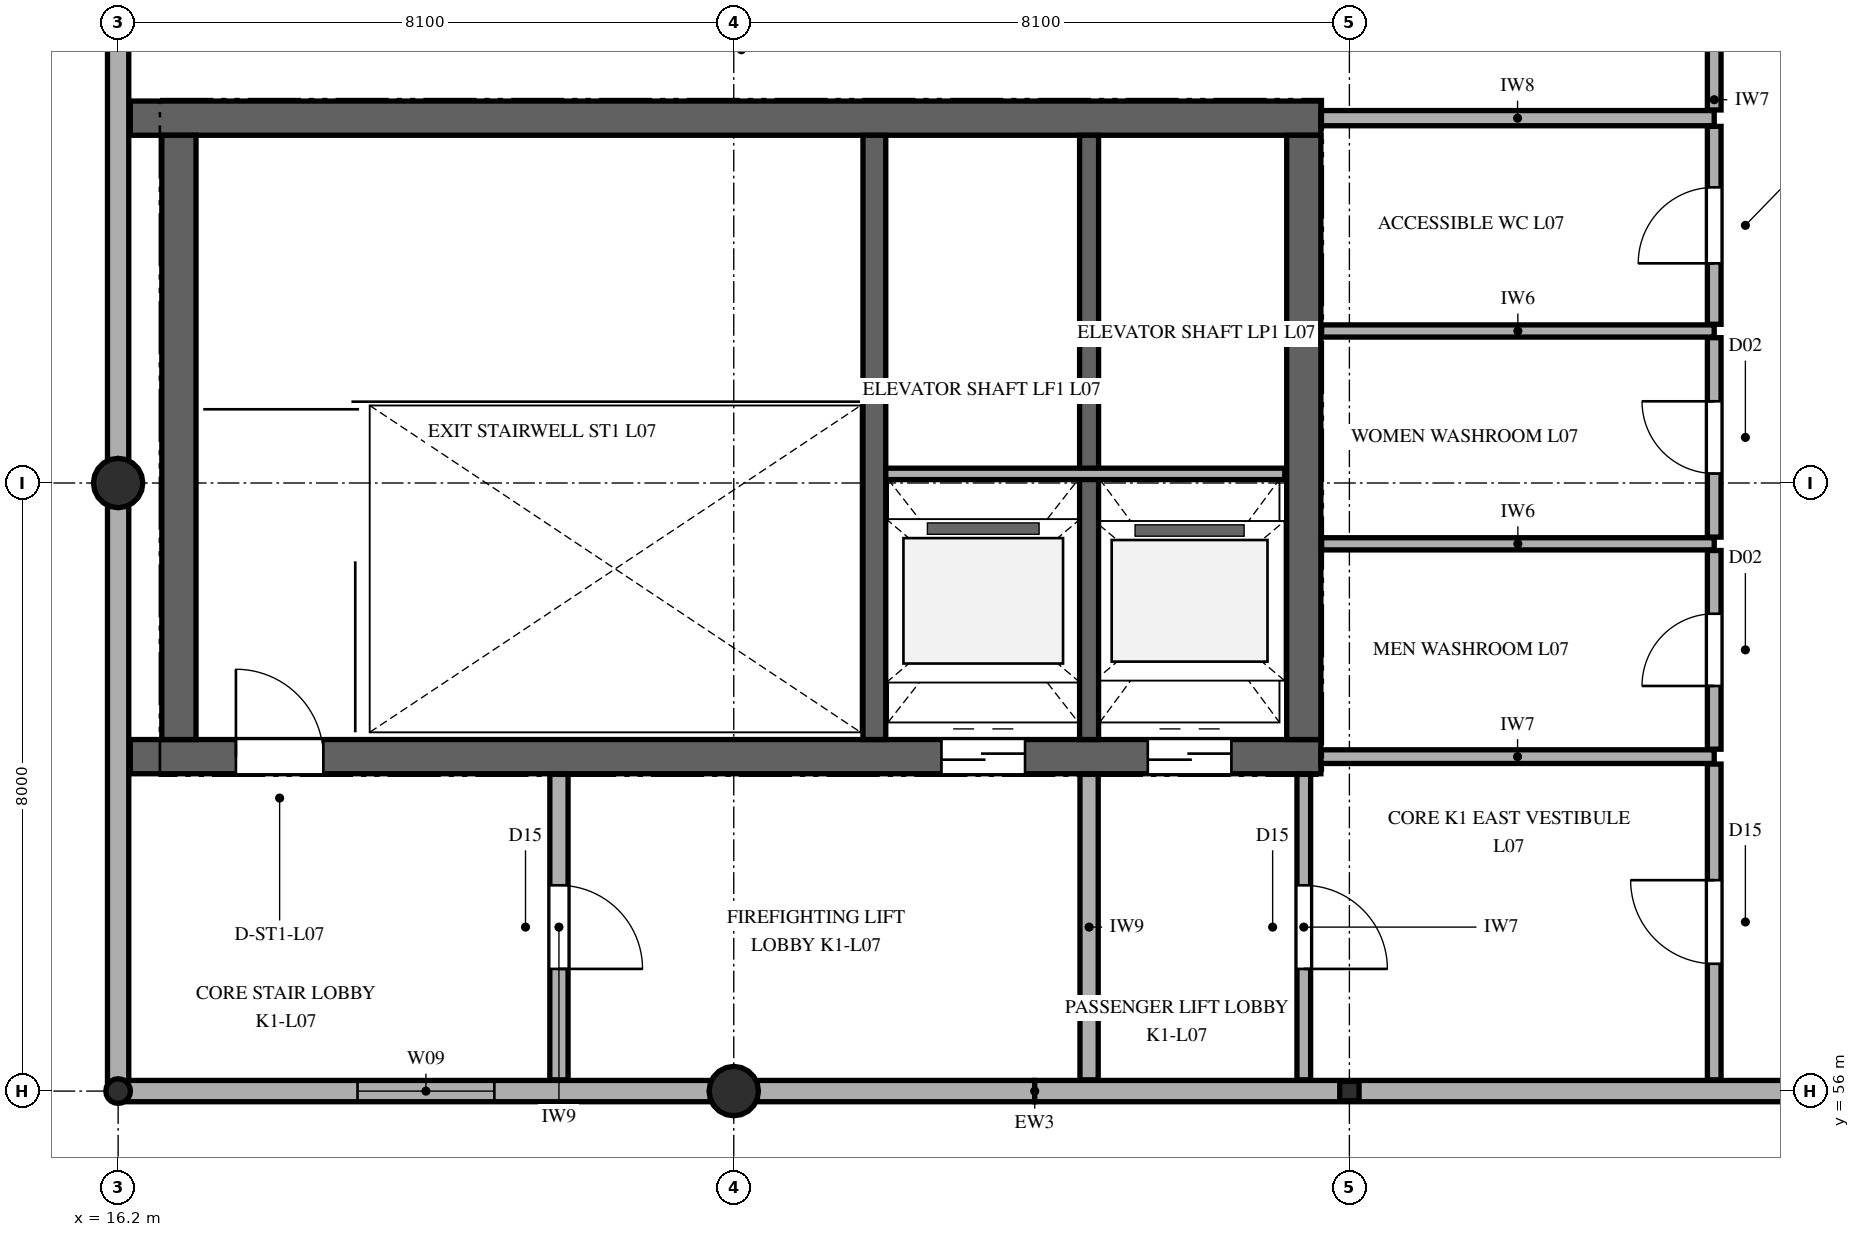
"""IFC4 building model, lengths in metres.
Left out: names, types, materials, properties, quantities, classifications, styles, units other than length and angle.
Written with IfcOpenShell. Run it as: python <this file> out.ifc"""

import sys

from ifc_helpers import new_model, si_unit, direction, frame, frame_2d, origin, origin_2d, place, context, subcontext, project, spatial, rectangle, hollow_rectangle, circle, hollow_circle, extrude, element, fill, save


model = new_model("IFC4")
c1 = context("Model", 3, precision=1e-05, world=origin(), true_north=direction((0.0, 1.0)))
c2 = subcontext(c1, "Body", "Model", "MODEL_VIEW")
j1 = project(units=[si_unit("LENGTHUNIT", "METRE"), si_unit("PLANEANGLEUNIT", "RADIAN")], contexts=[c1])
p1 = place(None, origin())
s1 = spatial("IfcSite", under=j1, at=p1, CompositionType="ELEMENT")
p2 = place(p1, origin())
s2 = spatial("IfcBuilding", under=s1, at=p2, CompositionType="ELEMENT")
p3 = place(p2, frame((0.0, 0.0, 33.3)))
s3 = spatial("IfcBuildingStorey", under=s2, at=p3, CompositionType="ELEMENT", Elevation=33.3)
p4 = place(p3, frame((16.36, 60.4, 0.0), z_axis=(0.0, 0.0, 1.0), x_axis=(1.0, 0.0, 0.0)))
e1 = element("IfcWall", 1, at=p4, inside=s3, PredefinedType="SHEAR", context=c2, shape_type="SweptSolid", body=[
    extrude(rectangle(XDim=15.665, YDim=0.45, at=frame_2d((7.833, 0.0))), origin(), (0.0, 0.0, 1.0), 3.98),
])
p5 = place(p4, frame((1.39, 0.0, 0.0)))
e2 = element("IfcOpeningElement", 2, at=p5, cuts=e1, PredefinedType="OPENING", context=c2, shape_type="SweptSolid", body=[
    extrude(rectangle(XDim=1.15, YDim=2.25, at=frame_2d((0.575, 1.125))), frame((0.0, 0.235, 0.0), z_axis=(0.0, -1.0, 0.0), x_axis=(1.0, 0.0, 0.0)), (0.0, 0.0, 1.0), 0.47),
])
p6 = place(p4, frame((10.673, 0.0, 0.0)))
e3 = element("IfcOpeningElement", 3, at=p6, cuts=e1, PredefinedType="OPENING", context=c2, shape_type="SweptSolid", body=[
    extrude(rectangle(XDim=1.1, YDim=2.2, at=frame_2d((0.55, 1.1))), frame((0.0, 0.235, 0.0), z_axis=(0.0, -1.0, 0.0), x_axis=(1.0, 0.0, 0.0)), (0.0, 0.0, 1.0), 0.47),
])
p7 = place(p4, frame((13.387, 0.0, 0.0)))
e4 = element("IfcOpeningElement", 4, at=p7, cuts=e1, PredefinedType="OPENING", context=c2, shape_type="SweptSolid", body=[
    extrude(rectangle(XDim=1.1, YDim=2.2, at=frame_2d((0.55, 1.1))), frame((0.0, 0.235, 0.0), z_axis=(0.0, -1.0, 0.0), x_axis=(1.0, 0.0, 0.0)), (0.0, 0.0, 1.0), 0.47),
])
p8 = place(p3, frame((16.36, 68.8, 0.0), z_axis=(0.0, 0.0, 1.0), x_axis=(1.0, 0.0, 0.0)))
e5 = element("IfcWall", 5, at=p8, inside=s3, PredefinedType="SHEAR", context=c2, shape_type="SweptSolid", body=[
    extrude(rectangle(XDim=15.665, YDim=0.45, at=frame_2d((7.833, 0.0))), origin(), (0.0, 0.0, 1.0), 3.98),
])
for number, where, z_axis, x_axis in (
    (6, (17.0, 60.625, 0.0), (0.0, 0.0, 1.0), (0.0, 1.0, 0.0)),
    (7, (31.8, 60.625, 0.0), (0.0, 0.0, 1.0), (0.0, 1.0, 0.0)),
):
    element("IfcWall", number, at=place(p3, frame(where, z_axis=z_axis, x_axis=x_axis)), inside=s3, PredefinedType="SHEAR", context=c2, shape_type="SweptSolid", body=[
        extrude(rectangle(XDim=7.95, YDim=0.45, at=frame_2d((3.975, 0.0))), origin(), (0.0, 0.0, 1.0), 3.98),
    ])
p9 = place(p3, frame((26.15, 60.625, 0.0), z_axis=(0.0, 0.0, 1.0), x_axis=(0.0, 1.0, 0.0)))
e8 = element("IfcWall", 8, at=p9, inside=s3, PredefinedType="SHEAR", context=c2, shape_type="SweptSolid", body=[
    extrude(rectangle(XDim=7.95, YDim=0.3, at=frame_2d((3.975, 0.0))), origin(), (0.0, 0.0, 1.0), 3.98),
])
p10 = place(p3, frame((28.975, 60.625, 0.0), z_axis=(0.0, 0.0, 1.0), x_axis=(0.0, 1.0, 0.0)))
e9 = element("IfcWall", 9, at=p10, inside=s3, PredefinedType="SHEAR", context=c2, shape_type="SweptSolid", body=[
    extrude(rectangle(XDim=7.95, YDim=0.25, at=frame_2d((3.975, 0.0))), origin(), (0.0, 0.0, 1.0), 3.98),
])
p11 = place(p3, frame((16.2, 56.0, 0.0), z_axis=(0.0, 0.0, 1.0), x_axis=(1.0, 0.0, 0.0)))
e10 = element("IfcColumn", 10, at=p11, inside=s3, PredefinedType="COLUMN", context=c2, shape_type="SweptSolid", body=[
    extrude(hollow_circle(Radius=0.162, WallThickness=0.013, at=origin_2d()), origin(), (0.0, 0.0, 1.0), 3.98),
])
for number, where, z_axis, x_axis in (
    (11, (16.2, 64.0, 0.0), (0.0, 0.0, 1.0), (1.0, 0.0, 0.0)),
    (12, (24.3, 56.0, 0.0), (0.0, 0.0, 1.0), (1.0, 0.0, 0.0)),
):
    element("IfcColumn", number, at=place(p3, frame(where, z_axis=z_axis, x_axis=x_axis)), inside=s3, PredefinedType="COLUMN", context=c2, shape_type="SweptSolid", body=[
        extrude(circle(Radius=0.325, at=origin_2d()), origin(), (0.0, 0.0, 1.0), 3.98),
    ])
p12 = place(p3, frame((32.4, 56.0, 0.0), z_axis=(0.0, 0.0, 1.0), x_axis=(1.0, 0.0, 0.0)))
e13 = element("IfcColumn", 13, at=p12, inside=s3, PredefinedType="COLUMN", context=c2, shape_type="SweptSolid", body=[
    extrude(hollow_rectangle(XDim=0.254, YDim=0.254, WallThickness=0.013, InnerFilletRadius=0.013, OuterFilletRadius=0.025, at=origin_2d()), origin(), (0.0, 0.0, 1.0), 3.98),
])
p13 = place(p3, frame((16.2, 70.0, 0.0), z_axis=(0.0, 0.0, 1.0), x_axis=(0.0, -1.0, 0.0)))
e14 = element("IfcWall", 14, at=p13, inside=s3, PredefinedType="SOLIDWALL", context=c2, shape_type="SweptSolid", body=[
    extrude(rectangle(XDim=14.0, YDim=0.28, at=frame_2d((7.0, 0.0))), origin(), (0.0, 0.0, 1.0), 3.655),
])
p14 = place(p3, frame((16.2, 56.0, 0.0), z_axis=(0.0, 0.0, 1.0), x_axis=(1.0, 0.0, 0.0)))
e15 = element("IfcWall", 15, at=p14, inside=s3, PredefinedType="SOLIDWALL", context=c2, shape_type="SweptSolid", body=[
    extrude(rectangle(XDim=12.06, YDim=0.28, at=frame_2d((6.03, 0.0))), origin(), (0.0, 0.0, 1.0), 3.655),
])
p15 = place(p14, frame((3.15, 0.0, 0.95)))
e16 = element("IfcOpeningElement", 16, at=p15, cuts=e15, PredefinedType="OPENING", context=c2, shape_type="SweptSolid", body=[
    extrude(rectangle(XDim=1.8, YDim=1.8, at=frame_2d((0.9, 0.9))), frame((0.0, 0.15, 0.0), z_axis=(0.0, -1.0, 0.0), x_axis=(1.0, 0.0, 0.0)), (0.0, 0.0, 1.0), 0.3),
])
p16 = place(p3, frame((28.26, 56.0, 0.0), z_axis=(0.0, 0.0, 1.0), x_axis=(1.0, 0.0, 0.0)))
e17 = element("IfcWall", 17, at=p16, inside=s3, PredefinedType="SOLIDWALL", context=c2, shape_type="SweptSolid", body=[
    extrude(rectangle(XDim=12.06, YDim=0.28, at=frame_2d((6.03, 0.0))), origin(), (0.0, 0.0, 1.0), 3.655),
])
p17 = place(p3, frame((18.0, 68.8, 3.98), z_axis=(0.0, 0.0, 1.0), x_axis=(1.0, 0.0, 0.0)))
e18 = element("IfcWall", 18, at=p17, inside=s3, PredefinedType="PARAPET", context=c2, shape_type="SweptSolid", body=[
    extrude(rectangle(XDim=12.8, YDim=0.22, at=frame_2d((6.4, 0.0))), origin(), (0.0, 0.0, 1.0), 2.17),
])
p18 = place(p3, frame((26.3, 64.12, 0.0), z_axis=(0.0, 0.0, 1.0), x_axis=(1.0, 0.0, 0.0)))
e19 = element("IfcWall", 19, at=p18, inside=s3, PredefinedType="PARTITIONING", context=c2, shape_type="SweptSolid", body=[
    extrude(rectangle(XDim=5.25, YDim=0.15, at=frame_2d((2.625, 0.0))), origin(), (0.0, 0.0, 1.0), 3.98),
])
p19 = place(p3, frame((32.025, 60.4, 0.0), z_axis=(0.0, 0.0, 1.0), x_axis=(1.0, 0.0, 0.0)))
e20 = element("IfcWall", 20, at=p19, inside=s3, PredefinedType="PARTITIONING", context=c2, shape_type="SweptSolid", body=[
    extrude(rectangle(XDim=5.175, YDim=0.18, at=frame_2d((2.587, 0.0))), origin(), (0.0, 0.0, 1.0), 3.98),
])
for number, where, z_axis, x_axis in (
    (21, (32.033, 63.2, 0.0), (0.0, 0.0, 1.0), (1.0, 0.0, 0.0)),
    (22, (32.033, 66.0, 0.0), (0.0, 0.0, 1.0), (1.0, 0.0, 0.0)),
):
    element("IfcWall", number, at=place(p3, frame(where, z_axis=z_axis, x_axis=x_axis)), inside=s3, PredefinedType="PARTITIONING", context=c2, shape_type="SweptSolid", body=[
        extrude(rectangle(XDim=5.167, YDim=0.16, at=frame_2d((2.583, 0.0))), origin(), (0.0, 0.0, 1.0), 3.98),
    ])
p20 = place(p3, frame((32.025, 68.8, 0.0), z_axis=(0.0, 0.0, 1.0), x_axis=(1.0, 0.0, 0.0)))
e23 = element("IfcWall", 23, at=p20, inside=s3, PredefinedType="PARTITIONING", context=c2, shape_type="SweptSolid", body=[
    extrude(rectangle(XDim=5.175, YDim=0.2, at=frame_2d((2.587, 0.0))), origin(), (0.0, 0.0, 1.0), 3.98),
])
p21 = place(p3, frame((22.0, 56.148, 0.0), z_axis=(0.0, 0.0, 1.0), x_axis=(0.0, 1.0, 0.0)))
e24 = element("IfcWall", 24, at=p21, inside=s3, PredefinedType="PARTITIONING", context=c2, shape_type="SweptSolid", body=[
    extrude(rectangle(XDim=4.019, YDim=0.24, at=frame_2d((2.01, 0.0))), origin(), (0.0, 0.0, 1.0), 3.98),
])
p22 = place(p21, frame((1.459, 0.0, 0.0)))
e25 = element("IfcOpeningElement", 25, at=p22, cuts=e24, PredefinedType="OPENING", context=c2, shape_type="SweptSolid", body=[
    extrude(rectangle(XDim=1.1, YDim=2.2, at=frame_2d((0.55, 1.1))), frame((0.0, 0.13, 0.0), z_axis=(0.0, -1.0, 0.0), x_axis=(1.0, 0.0, 0.0)), (0.0, 0.0, 1.0), 0.26),
])
p23 = place(p3, frame((28.975, 56.148, 0.0), z_axis=(0.0, 0.0, 1.0), x_axis=(0.0, 1.0, 0.0)))
e26 = element("IfcWall", 26, at=p23, inside=s3, PredefinedType="PARTITIONING", context=c2, shape_type="SweptSolid", body=[
    extrude(rectangle(XDim=4.019, YDim=0.24, at=frame_2d((2.01, 0.0))), origin(), (0.0, 0.0, 1.0), 3.98),
])
p24 = place(p3, frame((31.8, 56.148, 0.0), z_axis=(0.0, 0.0, 1.0), x_axis=(0.0, 1.0, 0.0)))
e27 = element("IfcWall", 27, at=p24, inside=s3, PredefinedType="PARTITIONING", context=c2, shape_type="SweptSolid", body=[
    extrude(rectangle(XDim=4.019, YDim=0.18, at=frame_2d((2.01, 0.0))), origin(), (0.0, 0.0, 1.0), 3.98),
])
p25 = place(p24, frame((1.459, 0.0, 0.0)))
e28 = element("IfcOpeningElement", 28, at=p25, cuts=e27, PredefinedType="OPENING", context=c2, shape_type="SweptSolid", body=[
    extrude(rectangle(XDim=1.1, YDim=2.2, at=frame_2d((0.55, 1.1))), frame((0.0, 0.1, 0.0), z_axis=(0.0, -1.0, 0.0), x_axis=(1.0, 0.0, 0.0)), (0.0, 0.0, 1.0), 0.2),
])
p26 = place(p3, frame((37.2, 56.148, 0.0), z_axis=(0.0, 0.0, 1.0), x_axis=(0.0, 1.0, 0.0)))
e29 = element("IfcWall", 29, at=p26, inside=s3, PredefinedType="PARTITIONING", context=c2, shape_type="SweptSolid", body=[
    extrude(rectangle(XDim=4.154, YDim=0.18, at=frame_2d((2.077, 0.0))), origin(), (0.0, 0.0, 1.0), 3.98),
])
p27 = place(p26, frame((1.527, 0.0, 0.0)))
e30 = element("IfcOpeningElement", 30, at=p27, cuts=e29, PredefinedType="OPENING", context=c2, shape_type="SweptSolid", body=[
    extrude(rectangle(XDim=1.1, YDim=2.2, at=frame_2d((0.55, 1.1))), frame((0.0, 0.1, 0.0), z_axis=(0.0, -1.0, 0.0), x_axis=(1.0, 0.0, 0.0)), (0.0, 0.0, 1.0), 0.2),
])
p28 = place(p3, frame((37.2, 60.498, 0.0), z_axis=(0.0, 0.0, 1.0), x_axis=(0.0, 1.0, 0.0)))
e31 = element("IfcWall", 31, at=p28, inside=s3, PredefinedType="PARTITIONING", context=c2, shape_type="SweptSolid", body=[
    extrude(rectangle(XDim=2.614, YDim=0.18, at=frame_2d((1.307, 0.0))), origin(), (0.0, 0.0, 1.0), 3.98),
])
p29 = place(p28, frame((0.832, 0.0, 0.0)))
e32 = element("IfcOpeningElement", 32, at=p29, cuts=e31, PredefinedType="OPENING", context=c2, shape_type="SweptSolid", body=[
    extrude(rectangle(XDim=0.95, YDim=2.1, at=frame_2d((0.475, 1.05))), frame((0.0, 0.1, 0.0), z_axis=(0.0, -1.0, 0.0), x_axis=(1.0, 0.0, 0.0)), (0.0, 0.0, 1.0), 0.2),
])
p30 = place(p3, frame((37.2, 63.288, 0.0), z_axis=(0.0, 0.0, 1.0), x_axis=(0.0, 1.0, 0.0)))
e33 = element("IfcWall", 33, at=p30, inside=s3, PredefinedType="PARTITIONING", context=c2, shape_type="SweptSolid", body=[
    extrude(rectangle(XDim=2.624, YDim=0.18, at=frame_2d((1.312, 0.0))), origin(), (0.0, 0.0, 1.0), 3.98),
])
p31 = place(p30, frame((0.837, 0.0, 0.0)))
e34 = element("IfcOpeningElement", 34, at=p31, cuts=e33, PredefinedType="OPENING", context=c2, shape_type="SweptSolid", body=[
    extrude(rectangle(XDim=0.95, YDim=2.1, at=frame_2d((0.475, 1.05))), frame((0.0, 0.1, 0.0), z_axis=(0.0, -1.0, 0.0), x_axis=(1.0, 0.0, 0.0)), (0.0, 0.0, 1.0), 0.2),
])
p32 = place(p3, frame((37.2, 66.088, 0.0), z_axis=(0.0, 0.0, 1.0), x_axis=(0.0, 1.0, 0.0)))
e35 = element("IfcWall", 35, at=p32, inside=s3, PredefinedType="PARTITIONING", context=c2, shape_type="SweptSolid", body=[
    extrude(rectangle(XDim=2.604, YDim=0.18, at=frame_2d((1.302, 0.0))), origin(), (0.0, 0.0, 1.0), 3.98),
])
p33 = place(p32, frame((0.802, 0.0, 0.0)))
e36 = element("IfcOpeningElement", 36, at=p33, cuts=e35, PredefinedType="OPENING", context=c2, shape_type="SweptSolid", body=[
    extrude(rectangle(XDim=1.0, YDim=2.15, at=frame_2d((0.5, 1.075))), frame((0.0, 0.1, 0.0), z_axis=(0.0, -1.0, 0.0), x_axis=(1.0, 0.0, 0.0)), (0.0, 0.0, 1.0), 0.2),
])
p34 = place(p3, frame((37.2, 68.908, 0.0), z_axis=(0.0, 0.0, 1.0), x_axis=(0.0, 1.0, 0.0)))
e37 = element("IfcWall", 37, at=p34, inside=s3, PredefinedType="PARTITIONING", context=c2, shape_type="SweptSolid", body=[
    extrude(rectangle(XDim=4.184, YDim=0.18, at=frame_2d((2.092, 0.0))), origin(), (0.0, 0.0, 1.0), 3.98),
])
p35 = place(p34, frame((1.542, 0.0, 0.0)))
e38 = element("IfcOpeningElement", 38, at=p35, cuts=e37, PredefinedType="OPENING", context=c2, shape_type="SweptSolid", body=[
    extrude(rectangle(XDim=1.1, YDim=2.2, at=frame_2d((0.55, 1.1))), frame((0.0, 0.1, 0.0), z_axis=(0.0, -1.0, 0.0), x_axis=(1.0, 0.0, 0.0)), (0.0, 0.0, 1.0), 0.2),
])
p36 = place(p15, origin())
e39 = element("IfcWindow", 39, at=p36, inside=s3, PartitioningType="DOUBLE_PANEL_VERTICAL", PredefinedType="WINDOW", context=c2, shape_type="SweptSolid", body=[
    extrude(rectangle(XDim=1.8, YDim=1.8, at=frame_2d((0.9, 0.9))), frame((0.0, 0.03, 0.0), z_axis=(0.0, -1.0, 0.0), x_axis=(1.0, 0.0, 0.0)), (0.0, 0.0, 1.0), 0.06),
])
fill(e16, e39)
p37 = place(p5, origin())
e40 = element("IfcDoor", 40, at=p37, inside=s3, OperationType="SINGLE_SWING_LEFT", PredefinedType="DOOR", context=c2, shape_type="SweptSolid", body=[
    extrude(rectangle(XDim=1.15, YDim=2.25, at=frame_2d((0.575, 1.125))), frame((0.0, 0.025, 0.0), z_axis=(0.0, -1.0, 0.0), x_axis=(1.0, 0.0, 0.0)), (0.0, 0.0, 1.0), 0.05),
])
fill(e2, e40)
p38 = place(p6, frame((1.1, 0.0, 0.0), z_axis=(0.0, 0.0, 1.0), x_axis=(-1.0, 0.0, 0.0)))
e41 = element("IfcDoor", 41, at=p38, inside=s3, OperationType="DOUBLE_DOOR_SLIDING", PredefinedType="DOOR", context=c2, shape_type="SweptSolid", body=[
    extrude(rectangle(XDim=1.1, YDim=2.2, at=frame_2d((0.55, 1.1))), frame((0.0, 0.025, 0.0), z_axis=(0.0, -1.0, 0.0), x_axis=(1.0, 0.0, 0.0)), (0.0, 0.0, 1.0), 0.05),
])
fill(e3, e41)
p39 = place(p7, frame((1.1, 0.0, 0.0), z_axis=(0.0, 0.0, 1.0), x_axis=(-1.0, 0.0, 0.0)))
e42 = element("IfcDoor", 42, at=p39, inside=s3, OperationType="DOUBLE_DOOR_SLIDING", PredefinedType="DOOR", context=c2, shape_type="SweptSolid", body=[
    extrude(rectangle(XDim=1.1, YDim=2.2, at=frame_2d((0.55, 1.1))), frame((0.0, 0.025, 0.0), z_axis=(0.0, -1.0, 0.0), x_axis=(1.0, 0.0, 0.0)), (0.0, 0.0, 1.0), 0.05),
])
fill(e4, e42)
p40 = place(p22, frame((1.1, 0.0, 0.0), z_axis=(0.0, 0.0, 1.0), x_axis=(-1.0, 0.0, 0.0)))
e43 = element("IfcDoor", 43, at=p40, inside=s3, OperationType="SINGLE_SWING_LEFT", PredefinedType="DOOR", context=c2, shape_type="SweptSolid", body=[
    extrude(rectangle(XDim=1.1, YDim=2.2, at=frame_2d((0.55, 1.1))), frame((0.0, 0.025, 0.0), z_axis=(0.0, -1.0, 0.0), x_axis=(1.0, 0.0, 0.0)), (0.0, 0.0, 1.0), 0.05),
])
fill(e25, e43)
p41 = place(p25, frame((1.1, 0.0, 0.0), z_axis=(0.0, 0.0, 1.0), x_axis=(-1.0, 0.0, 0.0)))
e44 = element("IfcDoor", 44, at=p41, inside=s3, OperationType="SINGLE_SWING_LEFT", PredefinedType="DOOR", context=c2, shape_type="SweptSolid", body=[
    extrude(rectangle(XDim=1.1, YDim=2.2, at=frame_2d((0.55, 1.1))), frame((0.0, 0.025, 0.0), z_axis=(0.0, -1.0, 0.0), x_axis=(1.0, 0.0, 0.0)), (0.0, 0.0, 1.0), 0.05),
])
fill(e28, e44)
p42 = place(p27, origin())
e45 = element("IfcDoor", 45, at=p42, inside=s3, OperationType="SINGLE_SWING_RIGHT", PredefinedType="DOOR", context=c2, shape_type="SweptSolid", body=[
    extrude(rectangle(XDim=1.1, YDim=2.2, at=frame_2d((0.55, 1.1))), frame((0.0, 0.025, 0.0), z_axis=(0.0, -1.0, 0.0), x_axis=(1.0, 0.0, 0.0)), (0.0, 0.0, 1.0), 0.05),
])
fill(e30, e45)
p43 = place(p29, origin())
e46 = element("IfcDoor", 46, at=p43, inside=s3, OperationType="SINGLE_SWING_LEFT", PredefinedType="DOOR", context=c2, shape_type="SweptSolid", body=[
    extrude(rectangle(XDim=0.95, YDim=2.1, at=frame_2d((0.475, 1.05))), frame((0.0, 0.025, 0.0), z_axis=(0.0, -1.0, 0.0), x_axis=(1.0, 0.0, 0.0)), (0.0, 0.0, 1.0), 0.05),
])
fill(e32, e46)
p44 = place(p31, origin())
e47 = element("IfcDoor", 47, at=p44, inside=s3, OperationType="SINGLE_SWING_RIGHT", PredefinedType="DOOR", context=c2, shape_type="SweptSolid", body=[
    extrude(rectangle(XDim=0.95, YDim=2.1, at=frame_2d((0.475, 1.05))), frame((0.0, 0.025, 0.0), z_axis=(0.0, -1.0, 0.0), x_axis=(1.0, 0.0, 0.0)), (0.0, 0.0, 1.0), 0.05),
])
fill(e34, e47)
p45 = place(p33, origin())
e48 = element("IfcDoor", 48, at=p45, inside=s3, OperationType="SINGLE_SWING_LEFT", PredefinedType="DOOR", context=c2, shape_type="SweptSolid", body=[
    extrude(rectangle(XDim=1.0, YDim=2.15, at=frame_2d((0.5, 1.075))), frame((0.0, 0.025, 0.0), z_axis=(0.0, -1.0, 0.0), x_axis=(1.0, 0.0, 0.0)), (0.0, 0.0, 1.0), 0.05),
])
fill(e36, e48)
save(model, sys.argv[1])
